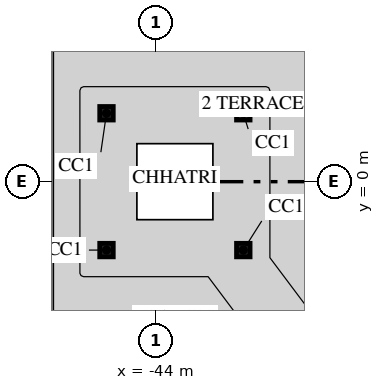
"""IFC4 building model, lengths in metres.
Left out: names, types, materials, properties, quantities, classifications, styles, units other than length and angle.
Written with IfcOpenShell. Run it as: python <this file> out.ifc"""

import sys

from ifc_helpers import new_model, si_unit, direction, frame, origin, origin_2d, place, context, subcontext, project, spatial, hollow_circle, extrude, element, save


model = new_model("IFC4")
c1 = context("Model", 3, precision=1e-05, world=origin(), true_north=direction((0.0, 1.0)))
c2 = subcontext(c1, "Body", "Model", "MODEL_VIEW")
j1 = project(units=[si_unit("LENGTHUNIT", "METRE"), si_unit("PLANEANGLEUNIT", "RADIAN")], contexts=[c1])
p1 = place(None, origin())
s1 = spatial("IfcSite", under=j1, at=p1, CompositionType="ELEMENT")
p2 = place(p1, origin())
s2 = spatial("IfcBuilding", under=s1, at=p2, CompositionType="ELEMENT")
p3 = place(p2, frame((0.0, 0.0, 30.5)))
s3 = spatial("IfcBuildingStorey", under=s2, at=p3, CompositionType="ELEMENT", Elevation=30.5)
for number, where, z_axis, x_axis in (
    (1, (-45.3, -1.8, 0.45), (0.0, 0.0, 1.0), (1.0, 0.0, 0.0)),
    (2, (-41.7, -1.8, 0.45), (0.0, 0.0, 1.0), (1.0, 0.0, 0.0)),
    (3, (-41.7, 1.8, 0.45), (0.0, 0.0, 1.0), (1.0, 0.0, 0.0)),
    (4, (-45.3, 1.8, 0.45), (0.0, 0.0, 1.0), (1.0, 0.0, 0.0)),
):
    element("IfcColumn", number, at=place(p3, frame(where, z_axis=z_axis, x_axis=x_axis)), inside=s3, PredefinedType="COLUMN", context=c2, shape_type="SweptSolid", body=[
        extrude(hollow_circle(Radius=0.178, WallThickness=0.016, at=origin_2d()), origin(), (0.0, 0.0, 1.0), 3.55),
    ])
save(model, sys.argv[1])
